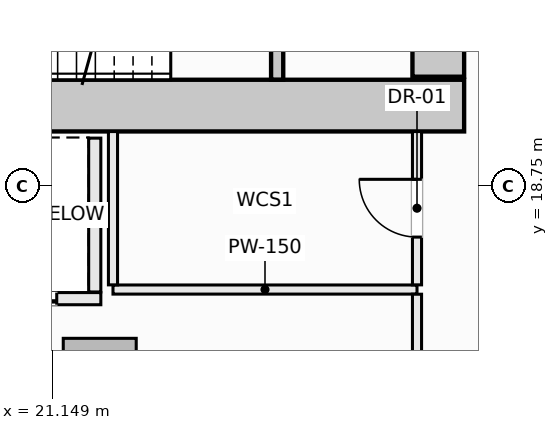
"""IFC4 building model, lengths in metres.
Left out: names, types, materials, properties, quantities, classifications, styles, units other than length and angle.
Written with IfcOpenShell. Run it as: python <this file> out.ifc"""

import sys

from ifc_helpers import new_model, si_unit, direction, frame, frame_2d, origin, origin_2d, place, context, subcontext, project, spatial, rectangle, extrude, element, fill, save


model = new_model("IFC4")
c1 = context("Model", 3, precision=1e-05, world=origin(), true_north=direction((0.0, 1.0)))
c2 = subcontext(c1, "Body", "Model", "MODEL_VIEW")
j1 = project(units=[si_unit("LENGTHUNIT", "METRE"), si_unit("PLANEANGLEUNIT", "RADIAN")], contexts=[c1])
p1 = place(None, origin())
s1 = spatial("IfcSite", under=j1, at=p1, CompositionType="ELEMENT")
p2 = place(p1, origin())
s2 = spatial("IfcBuilding", under=s1, at=p2, CompositionType="ELEMENT")
p3 = place(p2, frame((0.0, 0.0, 80.4)))
s3 = spatial("IfcBuildingStorey", under=s2, at=p3, CompositionType="ELEMENT", Elevation=80.4)
p4 = place(p3, frame((14.075, 20.075, -0.28), z_axis=(0.0, 0.0, 1.0), x_axis=(1.0, 0.0, 0.0)))
e1 = element("IfcWall", 1, at=p4, inside=s3, PredefinedType="SHEAR", context=c2, shape_type="SweptSolid", body=[
    extrude(rectangle(XDim=13.85, YDim=0.85, at=frame_2d((6.925, 0.0))), origin(), (0.0, 0.0, 1.0), 3.85),
])
p5 = place(p3, frame((27.5, 20.55, -0.28), z_axis=(0.0, 0.0, 1.0), x_axis=(0.0, 1.0, 0.0)))
e2 = element("IfcWall", 2, at=p5, inside=s3, PredefinedType="SHEAR", context=c2, shape_type="SweptSolid", body=[
    extrude(rectangle(XDim=1.5, YDim=0.85, at=frame_2d((0.75, 0.0))), origin(), (0.0, 0.0, 1.0), 3.85),
])
p6 = place(p3, frame((21.932, 15.648, -0.28), z_axis=(0.0, 0.0, 1.0), x_axis=(1.0, 0.0, 0.0)))
e3 = element("IfcColumn", 3, at=p6, inside=s3, PredefinedType="COLUMN", context=c2, shape_type="SweptSolid", body=[
    extrude(rectangle(XDim=1.2, YDim=1.2, at=origin_2d()), origin(), (0.0, 0.0, 1.0), 3.85),
])
p7 = place(p3, frame((24.85, 20.502, -0.28), z_axis=(0.0, 0.0, 1.0), x_axis=(0.0, 1.0, 0.0)))
e4 = element("IfcWall", 4, at=p7, inside=s3, PredefinedType="SHEAR", context=c2, shape_type="SweptSolid", body=[
    extrude(rectangle(XDim=3.038, YDim=0.2, at=frame_2d((1.519, 0.0))), origin(), (0.0, 0.0, 1.0), 3.85),
])
p8 = place(p7, frame((0.969, 0.0, 0.28)))
e5 = element("IfcOpeningElement", 5, at=p8, cuts=e4, PredefinedType="OPENING", context=c2, shape_type="SweptSolid", body=[
    extrude(rectangle(XDim=1.1, YDim=2.15, at=frame_2d((0.55, 1.075))), frame((0.0, 0.11, 0.0), z_axis=(0.0, -1.0, 0.0), x_axis=(1.0, 0.0, 0.0)), (0.0, 0.0, 1.0), 0.22),
])
p9 = place(p3, frame((19.4, 16.9, 0.0), z_axis=(0.0, 0.0, 1.0), x_axis=(1.0, 0.0, 0.0)))
e6 = element("IfcWall", 6, at=p9, inside=s3, PredefinedType="SOLIDWALL", context=c2, shape_type="SweptSolid", body=[
    extrude(rectangle(XDim=2.55, YDim=0.2, at=frame_2d((1.275, 0.0))), origin(), (0.0, 0.0, 1.0), 3.57),
])
p10 = place(p9, frame((0.725, 0.0, 0.0)))
e7 = element("IfcOpeningElement", 7, at=p10, cuts=e6, PredefinedType="OPENING", context=c2, shape_type="SweptSolid", body=[
    extrude(rectangle(XDim=1.1, YDim=2.2, at=frame_2d((0.55, 1.1))), frame((0.0, 0.11, 0.0), z_axis=(0.0, -1.0, 0.0), x_axis=(1.0, 0.0, 0.0)), (0.0, 0.0, 1.0), 0.22),
])
p11 = place(p3, frame((21.85, 17.01, 0.0), z_axis=(0.0, 0.0, 1.0), x_axis=(0.0, 1.0, 0.0)))
e8 = element("IfcWall", 8, at=p11, inside=s3, PredefinedType="SOLIDWALL", context=c2, shape_type="SweptSolid", body=[
    extrude(rectangle(XDim=2.53, YDim=0.2, at=frame_2d((1.265, 0.0))), origin(), (0.0, 0.0, 1.0), 3.57),
])
p12 = place(p3, frame((22.15, 17.05, 0.0), z_axis=(0.0, 0.0, 1.0), x_axis=(1.0, 0.0, 0.0)))
e9 = element("IfcWall", 9, at=p12, inside=s3, PredefinedType="PARTITIONING", context=c2, shape_type="SweptSolid", body=[
    extrude(rectangle(XDim=5.0, YDim=0.15, at=frame_2d((2.5, 0.0))), origin(), (0.0, 0.0, 1.0), 3.57),
])
p13 = place(p3, frame((22.15, 17.127, 0.0), z_axis=(0.0, 0.0, 1.0), x_axis=(0.0, 1.0, 0.0)))
e10 = element("IfcWall", 10, at=p13, inside=s3, PredefinedType="PARTITIONING", context=c2, shape_type="SweptSolid", body=[
    extrude(rectangle(XDim=2.521, YDim=0.15, at=frame_2d((1.26, 0.0))), origin(), (0.0, 0.0, 1.0), 3.57),
])
p14 = place(p3, frame((27.15, 13.85, 0.0), z_axis=(0.0, 0.0, 1.0), x_axis=(0.0, 1.0, 0.0)))
e11 = element("IfcWall", 11, at=p14, inside=s3, PredefinedType="PARTITIONING", context=c2, shape_type="SweptSolid", body=[
    extrude(rectangle(XDim=3.123, YDim=0.15, at=frame_2d((1.562, 0.0))), origin(), (0.0, 0.0, 1.0), 3.57),
])
p15 = place(p14, frame((1.218, 0.0, 0.0)))
e12 = element("IfcOpeningElement", 12, at=p15, cuts=e11, PredefinedType="OPENING", context=c2, shape_type="SweptSolid", body=[
    extrude(rectangle(XDim=0.95, YDim=2.1, at=frame_2d((0.475, 1.05))), frame((0.0, 0.085, 0.0), z_axis=(0.0, -1.0, 0.0), x_axis=(1.0, 0.0, 0.0)), (0.0, 0.0, 1.0), 0.17),
])
p16 = place(p3, frame((27.15, 17.127, 0.0), z_axis=(0.0, 0.0, 1.0), x_axis=(0.0, 1.0, 0.0)))
e13 = element("IfcWall", 13, at=p16, inside=s3, PredefinedType="PARTITIONING", context=c2, shape_type="SweptSolid", body=[
    extrude(rectangle(XDim=2.521, YDim=0.15, at=frame_2d((1.26, 0.0))), origin(), (0.0, 0.0, 1.0), 3.57),
])
p17 = place(p16, frame((0.785, 0.0, 0.0)))
e14 = element("IfcOpeningElement", 14, at=p17, cuts=e13, PredefinedType="OPENING", context=c2, shape_type="SweptSolid", body=[
    extrude(rectangle(XDim=0.95, YDim=2.1, at=frame_2d((0.475, 1.05))), frame((0.0, 0.085, 0.0), z_axis=(0.0, -1.0, 0.0), x_axis=(1.0, 0.0, 0.0)), (0.0, 0.0, 1.0), 0.17),
])
p18 = place(p3, frame((7.089, 17.026, 0.0), z_axis=(0.0, 0.0, 1.0), x_axis=(0.992316064114, -0.123728852337, 0.0)))
e15 = element("IfcWall", 15, at=p18, inside=s3, PredefinedType="PARTITIONING", context=c2, shape_type="SweptSolid", body=[
    extrude(rectangle(XDim=20.138, YDim=0.12, at=frame_2d((10.069, 0.0))), origin(), (0.0, 0.0, 1.0), 3.205),
])
p19 = place(p10, origin())
e16 = element("IfcDoor", 16, at=p19, inside=s3, OperationType="SLIDING_TO_LEFT", PredefinedType="DOOR", context=c2, shape_type="SweptSolid", body=[
    extrude(rectangle(XDim=1.1, YDim=2.2, at=frame_2d((0.55, 1.1))), frame((0.0, 0.025, 0.0), z_axis=(0.0, -1.0, 0.0), x_axis=(1.0, 0.0, 0.0)), (0.0, 0.0, 1.0), 0.05),
])
fill(e7, e16)
p20 = place(p17, origin())
e17 = element("IfcDoor", 17, at=p20, inside=s3, OperationType="SINGLE_SWING_RIGHT", PredefinedType="DOOR", context=c2, shape_type="SweptSolid", body=[
    extrude(rectangle(XDim=0.95, YDim=2.1, at=frame_2d((0.475, 1.05))), frame((0.0, 0.025, 0.0), z_axis=(0.0, -1.0, 0.0), x_axis=(1.0, 0.0, 0.0)), (0.0, 0.0, 1.0), 0.05),
])
fill(e14, e17)
save(model, sys.argv[1])
